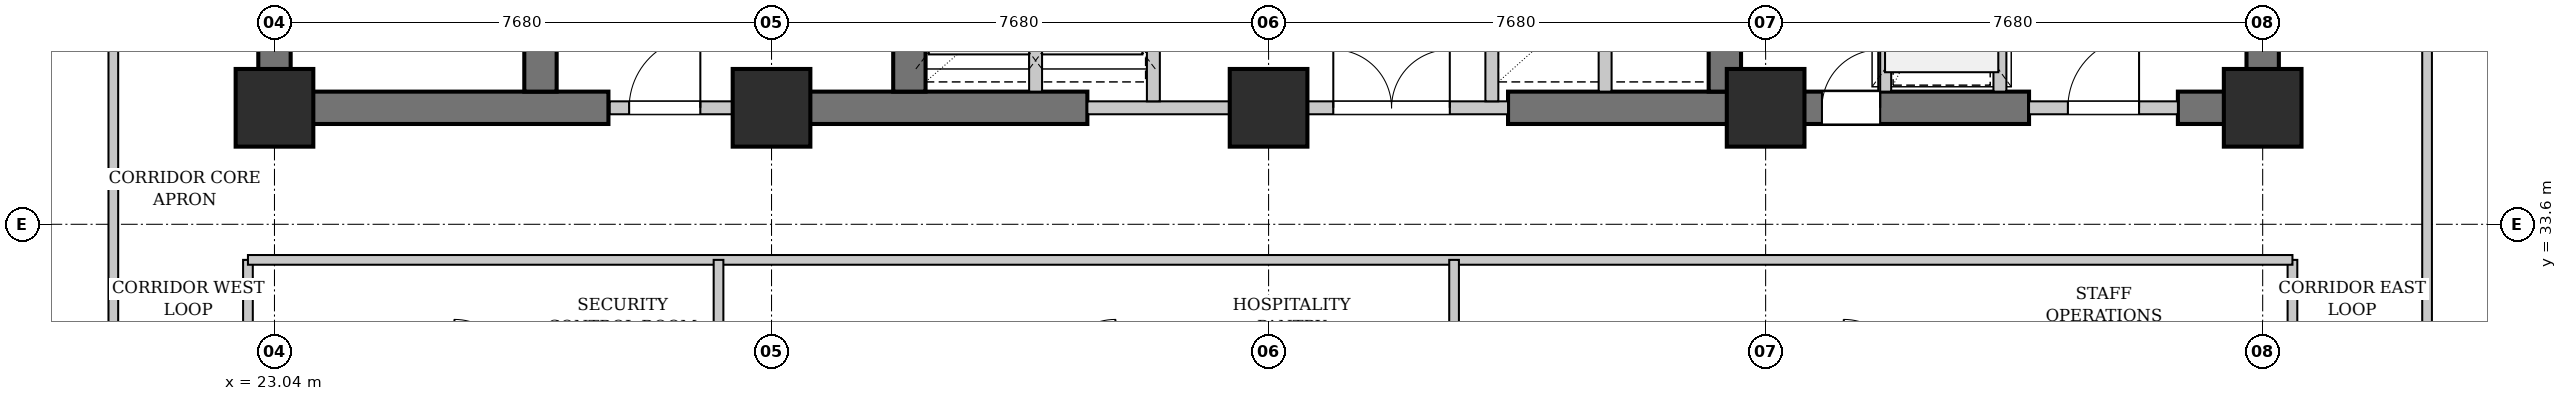
"""IFC4 building model, lengths in metres.
Left out: names, types, materials, properties, quantities, classifications, styles, units other than length and angle.
Written with IfcOpenShell. Run it as: python <this file> out.ifc"""

import sys

from ifc_helpers import new_model, si_unit, direction, frame, frame_2d, origin, origin_2d, place, context, subcontext, project, spatial, rectangle, extrude, element, fill, save


model = new_model("IFC4")
c1 = context("Model", 3, precision=1e-05, world=origin(), true_north=direction((0.0, 1.0)))
c2 = subcontext(c1, "Body", "Model", "MODEL_VIEW")
j1 = project(units=[si_unit("LENGTHUNIT", "METRE"), si_unit("PLANEANGLEUNIT", "RADIAN")], contexts=[c1])
p1 = place(None, origin())
s1 = spatial("IfcSite", under=j1, at=p1, CompositionType="ELEMENT")
p2 = place(p1, origin())
s2 = spatial("IfcBuilding", under=s1, at=p2, CompositionType="ELEMENT")
p3 = place(p2, frame((0.0, 0.0, 64.4)))
s3 = spatial("IfcBuildingStorey", under=s2, at=p3, CompositionType="ELEMENT", Elevation=64.4)
p4 = place(p3, frame((22.79, 35.4, 0.0), z_axis=(0.0, 0.0, 1.0), x_axis=(1.0, 0.0, 0.0)))
e1 = element("IfcWall", 1, at=p4, inside=s3, PredefinedType="SHEAR", context=c2, shape_type="SweptSolid", body=[
    extrude(rectangle(XDim=5.41, YDim=0.5, at=frame_2d((2.705, 0.0))), origin(), (0.0, 0.0, 1.0), 3.18),
])
p5 = place(p3, frame((30.72, 35.4, 0.0), z_axis=(0.0, 0.0, 1.0), x_axis=(1.0, 0.0, 0.0)))
e2 = element("IfcWall", 2, at=p5, inside=s3, PredefinedType="SHEAR", context=c2, shape_type="SweptSolid", body=[
    extrude(rectangle(XDim=4.88, YDim=0.5, at=frame_2d((2.44, 0.0))), origin(), (0.0, 0.0, 1.0), 3.18),
])
p6 = place(p3, frame((42.1, 35.4, 0.0), z_axis=(0.0, 0.0, 1.0), x_axis=(1.0, 0.0, 0.0)))
e3 = element("IfcWall", 3, at=p6, inside=s3, PredefinedType="SHEAR", context=c2, shape_type="SweptSolid", body=[
    extrude(rectangle(XDim=8.05, YDim=0.5, at=frame_2d((4.025, 0.0))), origin(), (0.0, 0.0, 1.0), 3.18),
])
p7 = place(p6, frame((4.85, 0.0, 0.0)))
e4 = element("IfcOpeningElement", 4, at=p7, cuts=e3, PredefinedType="OPENING", context=c2, shape_type="SweptSolid", body=[
    extrude(rectangle(XDim=0.9, YDim=2.15, at=frame_2d((0.45, 1.075))), frame((0.0, 0.26, 0.0), z_axis=(0.0, -1.0, 0.0), x_axis=(1.0, 0.0, 0.0)), (0.0, 0.0, 1.0), 0.52),
])
p8 = place(p3, frame((52.45, 35.4, 0.0), z_axis=(0.0, 0.0, 1.0), x_axis=(1.0, 0.0, 0.0)))
e5 = element("IfcWall", 5, at=p8, inside=s3, PredefinedType="SHEAR", context=c2, shape_type="SweptSolid", body=[
    extrude(rectangle(XDim=1.56, YDim=0.5, at=frame_2d((0.78, 0.0))), origin(), (0.0, 0.0, 1.0), 3.18),
])
p9 = place(p3, frame((23.04, 35.65, 0.0), z_axis=(0.0, 0.0, 1.0), x_axis=(0.0, 1.0, 0.0)))
e6 = element("IfcWall", 6, at=p9, inside=s3, PredefinedType="SHEAR", context=c2, shape_type="SweptSolid", body=[
    extrude(rectangle(XDim=10.3, YDim=0.5, at=frame_2d((5.15, 0.0))), origin(), (0.0, 0.0, 1.0), 3.18),
])
p10 = place(p3, frame((27.15, 35.65, 0.0), z_axis=(0.0, 0.0, 1.0), x_axis=(0.0, 1.0, 0.0)))
e7 = element("IfcWall", 7, at=p10, inside=s3, PredefinedType="SHEAR", context=c2, shape_type="SweptSolid", body=[
    extrude(rectangle(XDim=10.3, YDim=0.5, at=frame_2d((5.15, 0.0))), origin(), (0.0, 0.0, 1.0), 3.18),
])
p11 = place(p10, frame((0.65, 0.0, 0.0)))
e8 = element("IfcOpeningElement", 8, at=p11, cuts=e7, PredefinedType="OPENING", context=c2, shape_type="SweptSolid", body=[
    extrude(rectangle(XDim=1.1, YDim=2.15, at=frame_2d((0.55, 1.075))), frame((0.0, 0.26, 0.0), z_axis=(0.0, -1.0, 0.0), x_axis=(1.0, 0.0, 0.0)), (0.0, 0.0, 1.0), 0.52),
])
for number, where, z_axis, x_axis in (
    (9, (32.85, 35.65, 0.0), (0.0, 0.0, 1.0), (0.0, 1.0, 0.0)),
    (10, (45.45, 35.65, 0.0), (0.0, 0.0, 1.0), (0.0, 1.0, 0.0)),
    (11, (53.76, 35.65, 0.0), (0.0, 0.0, 1.0), (0.0, 1.0, 0.0)),
):
    element("IfcWall", number, at=place(p3, frame(where, z_axis=z_axis, x_axis=x_axis)), inside=s3, PredefinedType="SHEAR", context=c2, shape_type="SweptSolid", body=[
        extrude(rectangle(XDim=10.3, YDim=0.5, at=frame_2d((5.15, 0.0))), origin(), (0.0, 0.0, 1.0), 3.18),
    ])
for number, where, z_axis, x_axis in (
    (12, (23.04, 35.4, 0.0), (0.0, 0.0, 1.0), (1.0, 0.0, 0.0)),
    (13, (30.72, 35.4, 0.0), (0.0, 0.0, 1.0), (1.0, 0.0, 0.0)),
    (14, (38.4, 35.4, 0.0), (0.0, 0.0, 1.0), (1.0, 0.0, 0.0)),
    (15, (46.08, 35.4, 0.0), (0.0, 0.0, 1.0), (1.0, 0.0, 0.0)),
    (16, (53.76, 35.4, 0.0), (0.0, 0.0, 1.0), (1.0, 0.0, 0.0)),
):
    element("IfcColumn", number, at=place(p3, frame(where, z_axis=z_axis, x_axis=x_axis)), inside=s3, PredefinedType="COLUMN", context=c2, shape_type="SweptSolid", body=[
        extrude(rectangle(XDim=1.2, YDim=1.2, at=origin_2d()), origin(), (0.0, 0.0, 1.0), 3.4),
    ])
p12 = place(p3, frame((28.22, 35.4, 0.0), z_axis=(0.0, 0.0, 1.0), x_axis=(1.0, 0.0, 0.0)))
e17 = element("IfcWall", 17, at=p12, inside=s3, PredefinedType="PARTITIONING", context=c2, shape_type="SweptSolid", body=[
    extrude(rectangle(XDim=2.5, YDim=0.2, at=frame_2d((1.25, 0.0))), origin(), (0.0, 0.0, 1.0), 2.475),
])
p13 = place(p12, frame((0.3, 0.0, 0.0)))
e18 = element("IfcOpeningElement", 18, at=p13, cuts=e17, PredefinedType="OPENING", context=c2, shape_type="SweptSolid", body=[
    extrude(rectangle(XDim=1.1, YDim=2.15, at=frame_2d((0.55, 1.075))), frame((0.0, 0.11, 0.0), z_axis=(0.0, -1.0, 0.0), x_axis=(1.0, 0.0, 0.0)), (0.0, 0.0, 1.0), 0.22),
])
p14 = place(p3, frame((35.6, 35.4, 0.0), z_axis=(0.0, 0.0, 1.0), x_axis=(1.0, 0.0, 0.0)))
e19 = element("IfcWall", 19, at=p14, inside=s3, PredefinedType="PARTITIONING", context=c2, shape_type="SweptSolid", body=[
    extrude(rectangle(XDim=6.5, YDim=0.2, at=frame_2d((3.25, 0.0))), origin(), (0.0, 0.0, 1.0), 2.475),
])
p15 = place(p14, frame((3.8, 0.0, 0.0)))
e20 = element("IfcOpeningElement", 20, at=p15, cuts=e19, PredefinedType="OPENING", context=c2, shape_type="SweptSolid", body=[
    extrude(rectangle(XDim=1.8, YDim=2.3, at=frame_2d((0.9, 1.15))), frame((0.0, 0.11, 0.0), z_axis=(0.0, -1.0, 0.0), x_axis=(1.0, 0.0, 0.0)), (0.0, 0.0, 1.0), 0.22),
])
p16 = place(p3, frame((34.8, 35.65, 0.0), z_axis=(0.0, 0.0, 1.0), x_axis=(0.0, 1.0, 0.0)))
e21 = element("IfcWall", 21, at=p16, inside=s3, PredefinedType="PARTITIONING", context=c2, shape_type="SweptSolid", body=[
    extrude(rectangle(XDim=3.25, YDim=0.2, at=frame_2d((1.625, 0.0))), origin(), (0.0, 0.0, 1.0), 3.18),
])
p17 = place(p3, frame((36.62, 35.5, 0.0), z_axis=(0.0, 0.0, 1.0), x_axis=(0.0, 1.0, 0.0)))
e22 = element("IfcWall", 22, at=p17, inside=s3, PredefinedType="PARTITIONING", context=c2, shape_type="SweptSolid", body=[
    extrude(rectangle(XDim=3.4, YDim=0.2, at=frame_2d((1.7, 0.0))), origin(), (0.0, 0.0, 1.0), 3.18),
])
p18 = place(p3, frame((43.6, 35.65, 0.0), z_axis=(0.0, 0.0, 1.0), x_axis=(0.0, 1.0, 0.0)))
e23 = element("IfcWall", 23, at=p18, inside=s3, PredefinedType="PARTITIONING", context=c2, shape_type="SweptSolid", body=[
    extrude(rectangle(XDim=3.25, YDim=0.2, at=frame_2d((1.625, 0.0))), origin(), (0.0, 0.0, 1.0), 3.18),
])
p19 = place(p3, frame((41.85, 35.5, 0.0), z_axis=(0.0, 0.0, 1.0), x_axis=(0.0, 1.0, 0.0)))
e24 = element("IfcWall", 24, at=p19, inside=s3, PredefinedType="PARTITIONING", context=c2, shape_type="SweptSolid", body=[
    extrude(rectangle(XDim=3.4, YDim=0.2, at=frame_2d((1.7, 0.0))), origin(), (0.0, 0.0, 1.0), 3.18),
])
p20 = place(p3, frame((50.15, 35.4, 0.0), z_axis=(0.0, 0.0, 1.0), x_axis=(1.0, 0.0, 0.0)))
e25 = element("IfcWall", 25, at=p20, inside=s3, PredefinedType="PARTITIONING", context=c2, shape_type="SweptSolid", body=[
    extrude(rectangle(XDim=2.3, YDim=0.2, at=frame_2d((1.15, 0.0))), origin(), (0.0, 0.0, 1.0), 2.475),
])
p21 = place(p20, frame((0.6, 0.0, 0.0)))
e26 = element("IfcOpeningElement", 26, at=p21, cuts=e25, PredefinedType="OPENING", context=c2, shape_type="SweptSolid", body=[
    extrude(rectangle(XDim=1.1, YDim=2.15, at=frame_2d((0.55, 1.075))), frame((0.0, 0.11, 0.0), z_axis=(0.0, -1.0, 0.0), x_axis=(1.0, 0.0, 0.0)), (0.0, 0.0, 1.0), 0.22),
])
p22 = place(p3, frame((49.7, 35.65, 0.0), z_axis=(0.0, 0.0, 1.0), x_axis=(0.0, 1.0, 0.0)))
e27 = element("IfcWall", 27, at=p22, inside=s3, PredefinedType="PARTITIONING", context=c2, shape_type="SweptSolid", body=[
    extrude(rectangle(XDim=3.15, YDim=0.2, at=frame_2d((1.575, 0.0))), origin(), (0.0, 0.0, 1.0), 3.18),
])
p23 = place(p22, frame((0.85, 0.0, 0.0)))
e28 = element("IfcOpeningElement", 28, at=p23, cuts=e27, PredefinedType="OPENING", context=c2, shape_type="SweptSolid", body=[
    extrude(rectangle(XDim=1.2, YDim=2.2, at=frame_2d((0.6, 1.1))), frame((0.0, 0.11, 0.0), z_axis=(0.0, -1.0, 0.0), x_axis=(1.0, 0.0, 0.0)), (0.0, 0.0, 1.0), 0.22),
])
p24 = place(p3, frame((47.92, 35.65, 0.0), z_axis=(0.0, 0.0, 1.0), x_axis=(0.0, 1.0, 0.0)))
e29 = element("IfcWall", 29, at=p24, inside=s3, PredefinedType="PARTITIONING", context=c2, shape_type="SweptSolid", body=[
    extrude(rectangle(XDim=3.15, YDim=0.2, at=frame_2d((1.575, 0.0))), origin(), (0.0, 0.0, 1.0), 3.18),
])
p25 = place(p3, frame((20.55, 29.15, 0.0), z_axis=(0.0, 0.0, 1.0), x_axis=(0.0, 1.0, 0.0)))
e30 = element("IfcWall", 30, at=p25, inside=s3, PredefinedType="PARTITIONING", context=c2, shape_type="SweptSolid", body=[
    extrude(rectangle(XDim=19.37, YDim=0.15, at=frame_2d((9.685, 0.0))), origin(), (0.0, 0.0, 1.0), 3.18),
])
p26 = place(p25, frame((1.03, 0.0, 0.0)))
e31 = element("IfcOpeningElement", 31, at=p26, cuts=e30, PredefinedType="OPENING", context=c2, shape_type="SweptSolid", body=[
    extrude(rectangle(XDim=0.9, YDim=2.15, at=frame_2d((0.45, 1.075))), frame((0.0, 0.085, 0.0), z_axis=(0.0, -1.0, 0.0), x_axis=(1.0, 0.0, 0.0)), (0.0, 0.0, 1.0), 0.17),
])
p27 = place(p3, frame((56.3, 29.15, 0.0), z_axis=(0.0, 0.0, 1.0), x_axis=(0.0, 1.0, 0.0)))
e32 = element("IfcWall", 32, at=p27, inside=s3, PredefinedType="PARTITIONING", context=c2, shape_type="SweptSolid", body=[
    extrude(rectangle(XDim=19.37, YDim=0.15, at=frame_2d((9.685, 0.0))), origin(), (0.0, 0.0, 1.0), 3.18),
])
p28 = place(p27, frame((1.03, 0.0, 0.0)))
e33 = element("IfcOpeningElement", 33, at=p28, cuts=e32, PredefinedType="OPENING", context=c2, shape_type="SweptSolid", body=[
    extrude(rectangle(XDim=0.9, YDim=2.15, at=frame_2d((0.45, 1.075))), frame((0.0, 0.085, 0.0), z_axis=(0.0, -1.0, 0.0), x_axis=(1.0, 0.0, 0.0)), (0.0, 0.0, 1.0), 0.17),
])
for number, where, z_axis, x_axis in (
    (34, (22.63, 31.23, 0.0), (0.0, 0.0, 1.0), (0.0, 1.0, 0.0)),
    (35, (54.22, 31.23, 0.0), (0.0, 0.0, 1.0), (0.0, 1.0, 0.0)),
):
    element("IfcWall", number, at=place(p3, frame(where, z_axis=z_axis, x_axis=x_axis)), inside=s3, PredefinedType="PARTITIONING", context=c2, shape_type="SweptSolid", body=[
        extrude(rectangle(XDim=1.82, YDim=0.15, at=frame_2d((0.91, 0.0))), origin(), (0.0, 0.0, 1.0), 3.18),
    ])
p29 = place(p3, frame((22.63, 33.05, 0.0), z_axis=(0.0, 0.0, 1.0), x_axis=(1.0, 0.0, 0.0)))
e36 = element("IfcWall", 36, at=p29, inside=s3, PredefinedType="PARTITIONING", context=c2, shape_type="SweptSolid", body=[
    extrude(rectangle(XDim=31.59, YDim=0.15, at=frame_2d((15.795, 0.0))), origin(), (0.0, 0.0, 1.0), 3.18),
])
for number, where, z_axis, x_axis in (
    (37, (29.901, 31.23, 0.0), (0.0, 0.0, 1.0), (0.0, 1.0, 0.0)),
    (38, (41.266, 31.23, 0.0), (0.0, 0.0, 1.0), (0.0, 1.0, 0.0)),
):
    element("IfcWall", number, at=place(p3, frame(where, z_axis=z_axis, x_axis=x_axis)), inside=s3, PredefinedType="PARTITIONING", context=c2, shape_type="SweptSolid", body=[
        extrude(rectangle(XDim=1.82, YDim=0.15, at=frame_2d((0.91, 0.0))), origin(), (0.0, 0.0, 1.0), 3.18),
    ])
p30 = place(p13, origin())
e39 = element("IfcDoor", 39, at=p30, inside=s3, OperationType="SINGLE_SWING_RIGHT", PredefinedType="DOOR", context=c2, shape_type="SweptSolid", body=[
    extrude(rectangle(XDim=1.1, YDim=2.15, at=frame_2d((0.55, 1.075))), frame((0.0, 0.025, 0.0), z_axis=(0.0, -1.0, 0.0), x_axis=(1.0, 0.0, 0.0)), (0.0, 0.0, 1.0), 0.05),
])
fill(e18, e39)
p31 = place(p15, origin())
e40 = element("IfcDoor", 40, at=p31, inside=s3, OperationType="DOUBLE_DOOR_SINGLE_SWING", PredefinedType="DOOR", context=c2, shape_type="SweptSolid", body=[
    extrude(rectangle(XDim=1.8, YDim=2.3, at=frame_2d((0.9, 1.15))), frame((0.0, 0.025, 0.0), z_axis=(0.0, -1.0, 0.0), x_axis=(1.0, 0.0, 0.0)), (0.0, 0.0, 1.0), 0.05),
])
fill(e20, e40)
p32 = place(p21, origin())
e41 = element("IfcDoor", 41, at=p32, inside=s3, OperationType="SINGLE_SWING_RIGHT", PredefinedType="DOOR", context=c2, shape_type="SweptSolid", body=[
    extrude(rectangle(XDim=1.1, YDim=2.15, at=frame_2d((0.55, 1.075))), frame((0.0, 0.025, 0.0), z_axis=(0.0, -1.0, 0.0), x_axis=(1.0, 0.0, 0.0)), (0.0, 0.0, 1.0), 0.05),
])
fill(e26, e41)
p33 = place(p7, origin())
e42 = element("IfcDoor", 42, at=p33, inside=s3, OperationType="SINGLE_SWING_RIGHT", PredefinedType="DOOR", context=c2, shape_type="SweptSolid", body=[
    extrude(rectangle(XDim=0.9, YDim=2.15, at=frame_2d((0.45, 1.075))), frame((0.0, 0.025, 0.0), z_axis=(0.0, -1.0, 0.0), x_axis=(1.0, 0.0, 0.0)), (0.0, 0.0, 1.0), 0.05),
])
fill(e4, e42)
save(model, sys.argv[1])
